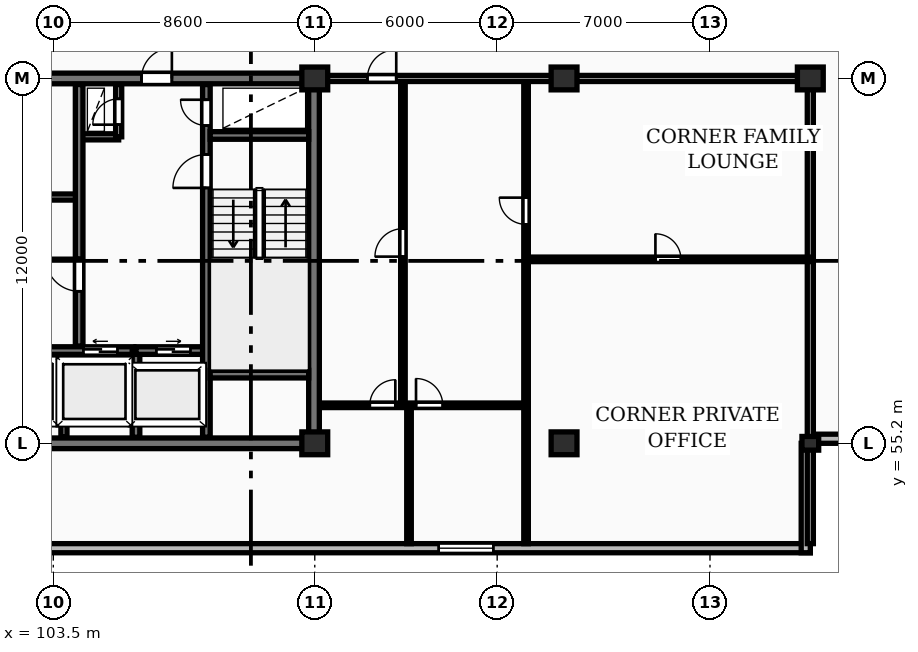
"""IFC4 building model, lengths in metres.
Left out: names, types, materials, properties, quantities, classifications, styles, units other than length and angle.
Written with IfcOpenShell. Run it as: python <this file> out.ifc"""

import sys

from ifc_helpers import new_model, si_unit, direction, frame, frame_2d, origin, origin_2d, place, context, subcontext, project, spatial, rectangle, extrude, element, fill, save


model = new_model("IFC4")
c1 = context("Model", 3, precision=1e-05, world=origin(), true_north=direction((0.0, 1.0)))
c2 = subcontext(c1, "Body", "Model", "MODEL_VIEW")
j1 = project(units=[si_unit("LENGTHUNIT", "METRE"), si_unit("PLANEANGLEUNIT", "RADIAN")], contexts=[c1])
p1 = place(None, origin())
s1 = spatial("IfcSite", under=j1, at=p1, CompositionType="ELEMENT")
p2 = place(p1, origin())
s2 = spatial("IfcBuilding", under=s1, at=p2, CompositionType="ELEMENT")
p3 = place(p2, frame((0.0, 0.0, 207.6)))
s3 = spatial("IfcBuildingStorey", under=s2, at=p3, CompositionType="ELEMENT", Elevation=207.6)
for number, where, z_axis, x_axis in (
    (1, (112.1, 55.2, 0.0), (0.0, 0.0, 1.0), (1.0, 0.0, 0.0)),
    (2, (112.1, 67.2, 0.0), (0.0, 0.0, 1.0), (1.0, 0.0, 0.0)),
    (3, (120.3, 55.2, 0.0), (0.0, 0.0, 1.0), (1.0, 0.0, 0.0)),
    (4, (120.3, 67.2, 0.0), (0.0, 0.0, 1.0), (1.0, 0.0, 0.0)),
):
    element("IfcColumn", number, at=place(p3, frame(where, z_axis=z_axis, x_axis=x_axis)), inside=s3, PredefinedType="COLUMN", context=c2, shape_type="SweptSolid", body=[
        extrude(rectangle(XDim=0.85, YDim=0.75, at=origin_2d()), origin(), (0.0, 0.0, 1.0), 3.25),
    ])
p4 = place(p3, frame((128.4, 55.2, 0.0), z_axis=(0.0, 0.0, 1.0), x_axis=(1.0, 0.0, 0.0)))
e5 = element("IfcColumn", 5, at=p4, inside=s3, PredefinedType="PILASTER", context=c2, shape_type="SweptSolid", body=[
    extrude(rectangle(XDim=0.55, YDim=0.45, at=origin_2d()), origin(), (0.0, 0.0, 1.0), 3.25),
])
p5 = place(p3, frame((128.4, 67.2, 0.0), z_axis=(0.0, 0.0, 1.0), x_axis=(1.0, 0.0, 0.0)))
e6 = element("IfcColumn", 6, at=p5, inside=s3, PredefinedType="COLUMN", context=c2, shape_type="SweptSolid", body=[
    extrude(rectangle(XDim=0.85, YDim=0.75, at=origin_2d()), origin(), (0.0, 0.0, 1.0), 3.25),
])
p6 = place(p3, frame((59.8, 51.75, 0.0), z_axis=(0.0, 0.0, 1.0), x_axis=(1.0, 0.0, 0.0)))
e7 = element("IfcWall", 7, at=p6, inside=s3, PredefinedType="STANDARD", context=c2, shape_type="SweptSolid", body=[
    extrude(rectangle(XDim=68.6, YDim=0.3, at=frame_2d((34.3, 0.0))), origin(), (0.0, 0.0, 1.0), 2.97),
])
p7 = place(p6, frame((13.025, 0.0, 0.85)))
e8 = element("IfcOpeningElement", 8, at=p7, cuts=e7, PredefinedType="OPENING", context=c2, shape_type="SweptSolid", body=[
    extrude(rectangle(XDim=1.8, YDim=1.8, at=frame_2d((0.9, 0.9))), frame((0.0, 0.16, 0.0), z_axis=(0.0, -1.0, 0.0), x_axis=(1.0, 0.0, 0.0)), (0.0, 0.0, 1.0), 0.32),
])
p8 = place(p6, frame((56.375, 0.0, 0.85)))
e9 = element("IfcOpeningElement", 9, at=p8, cuts=e7, PredefinedType="OPENING", context=c2, shape_type="SweptSolid", body=[
    extrude(rectangle(XDim=1.8, YDim=1.8, at=frame_2d((0.9, 0.9))), frame((0.0, 0.16, 0.0), z_axis=(0.0, -1.0, 0.0), x_axis=(1.0, 0.0, 0.0)), (0.0, 0.0, 1.0), 0.32),
])
p9 = place(p3, frame((128.25, 51.6, 0.0), z_axis=(0.0, 0.0, 1.0), x_axis=(0.0, 1.0, 0.0)))
e10 = element("IfcWall", 10, at=p9, inside=s3, PredefinedType="STANDARD", context=c2, shape_type="SweptSolid", body=[
    extrude(rectangle(XDim=3.6, YDim=0.3, at=frame_2d((1.8, 0.0))), origin(), (0.0, 0.0, 1.0), 2.97),
])
p10 = place(p3, frame((128.4, 55.35, 0.0), z_axis=(0.0, 0.0, 1.0), x_axis=(1.0, 0.0, 0.0)))
e11 = element("IfcWall", 11, at=p10, inside=s3, PredefinedType="STANDARD", context=c2, shape_type="SweptSolid", body=[
    extrude(rectangle(XDim=3.6, YDim=0.3, at=frame_2d((1.8, 0.0))), origin(), (0.0, 0.0, 1.0), 2.97),
])
p11 = place(p3, frame((75.95, 55.2, 0.0), z_axis=(0.0, 0.0, 1.0), x_axis=(1.0, 0.0, 0.0)))
e12 = element("IfcWall", 12, at=p11, inside=s3, PredefinedType="SHEAR", context=c2, shape_type="SweptSolid", body=[
    extrude(rectangle(XDim=36.3, YDim=0.35, at=frame_2d((18.15, 0.0))), origin(), (0.0, 0.0, 1.0), 3.25),
])
p12 = place(p3, frame((112.075, 55.375, 0.0), z_axis=(0.0, 0.0, 1.0), x_axis=(0.0, 1.0, 0.0)))
e13 = element("IfcWall", 13, at=p12, inside=s3, PredefinedType="SHEAR", context=c2, shape_type="SweptSolid", body=[
    extrude(rectangle(XDim=11.65, YDim=0.35, at=frame_2d((5.825, 0.0))), origin(), (0.0, 0.0, 1.0), 3.25),
])
p13 = place(p3, frame((75.95, 67.2, 0.0), z_axis=(0.0, 0.0, 1.0), x_axis=(1.0, 0.0, 0.0)))
e14 = element("IfcWall", 14, at=p13, inside=s3, PredefinedType="SHEAR", context=c2, shape_type="SweptSolid", body=[
    extrude(rectangle(XDim=36.3, YDim=0.35, at=frame_2d((18.15, 0.0))), origin(), (0.0, 0.0, 1.0), 3.25),
])
p14 = place(p13, frame((5.25, 0.0, 0.0)))
e15 = element("IfcOpeningElement", 15, at=p14, cuts=e14, PredefinedType="OPENING", context=c2, shape_type="SweptSolid", body=[
    extrude(rectangle(XDim=1.0, YDim=2.15, at=frame_2d((0.5, 1.075))), frame((0.0, 0.185, 0.0), z_axis=(0.0, -1.0, 0.0), x_axis=(1.0, 0.0, 0.0)), (0.0, 0.0, 1.0), 0.37),
])
p15 = place(p13, frame((21.6, 0.0, 0.0)))
e16 = element("IfcOpeningElement", 16, at=p15, cuts=e14, PredefinedType="OPENING", context=c2, shape_type="SweptSolid", body=[
    extrude(rectangle(XDim=1.5, YDim=2.2, at=frame_2d((0.75, 1.1))), frame((0.0, 0.185, 0.0), z_axis=(0.0, -1.0, 0.0), x_axis=(1.0, 0.0, 0.0)), (0.0, 0.0, 1.0), 0.37),
])
p16 = place(p13, frame((30.45, 0.0, 0.0)))
e17 = element("IfcOpeningElement", 17, at=p16, cuts=e14, PredefinedType="OPENING", context=c2, shape_type="SweptSolid", body=[
    extrude(rectangle(XDim=1.0, YDim=2.15, at=frame_2d((0.5, 1.075))), frame((0.0, 0.185, 0.0), z_axis=(0.0, -1.0, 0.0), x_axis=(1.0, 0.0, 0.0)), (0.0, 0.0, 1.0), 0.37),
])
p17 = place(p3, frame((103.85, 55.4, 0.0), z_axis=(0.0, 0.0, 1.0), x_axis=(0.0, 1.0, 0.0)))
e18 = element("IfcWall", 18, at=p17, inside=s3, PredefinedType="PARTITIONING", context=c2, shape_type="SweptSolid", body=[
    extrude(rectangle(XDim=2.72, YDim=0.2, at=frame_2d((1.36, 0.0))), origin(), (0.0, 0.0, 1.0), 2.97),
])
p18 = place(p3, frame((101.55, 58.25, 0.0), z_axis=(0.0, 0.0, 1.0), x_axis=(1.0, 0.0, 0.0)))
e19 = element("IfcWall", 19, at=p18, inside=s3, PredefinedType="SHEAR", context=c2, shape_type="SweptSolid", body=[
    extrude(rectangle(XDim=4.6, YDim=0.25, at=frame_2d((2.3, 0.0))), origin(), (0.0, 0.0, 1.0), 3.25),
])
p19 = place(p18, frame((0.54, 0.0, 0.0)))
e20 = element("IfcOpeningElement", 20, at=p19, cuts=e19, PredefinedType="OPENING", context=c2, shape_type="SweptSolid", body=[
    extrude(rectangle(XDim=1.12, YDim=2.12, at=frame_2d((0.56, 1.06))), frame((0.0, 0.135, 0.0), z_axis=(0.0, -1.0, 0.0), x_axis=(1.0, 0.0, 0.0)), (0.0, 0.0, 1.0), 0.27),
])
p20 = place(p18, frame((2.94, 0.0, 0.0)))
e21 = element("IfcOpeningElement", 21, at=p20, cuts=e19, PredefinedType="OPENING", context=c2, shape_type="SweptSolid", body=[
    extrude(rectangle(XDim=1.12, YDim=2.12, at=frame_2d((0.56, 1.06))), frame((0.0, 0.135, 0.0), z_axis=(0.0, -1.0, 0.0), x_axis=(1.0, 0.0, 0.0)), (0.0, 0.0, 1.0), 0.27),
])
p21 = place(p3, frame((106.22, 55.4, 0.0), z_axis=(0.0, 0.0, 1.0), x_axis=(0.0, 1.0, 0.0)))
e22 = element("IfcWall", 22, at=p21, inside=s3, PredefinedType="SHEAR", context=c2, shape_type="SweptSolid", body=[
    extrude(rectangle(XDim=2.85, YDim=0.25, at=frame_2d((1.425, 0.0))), origin(), (0.0, 0.0, 1.0), 3.25),
])
p22 = place(p3, frame((106.22, 58.25, 0.0), z_axis=(0.0, 0.0, 1.0), x_axis=(1.0, 0.0, 0.0)))
e23 = element("IfcWall", 23, at=p22, inside=s3, PredefinedType="SHEAR", context=c2, shape_type="SweptSolid", body=[
    extrude(rectangle(XDim=2.46, YDim=0.25, at=frame_2d((1.23, 0.0))), origin(), (0.0, 0.0, 1.0), 3.25),
])
p23 = place(p22, frame((0.67, 0.0, 0.0)))
e24 = element("IfcOpeningElement", 24, at=p23, cuts=e23, PredefinedType="OPENING", context=c2, shape_type="SweptSolid", body=[
    extrude(rectangle(XDim=1.12, YDim=2.12, at=frame_2d((0.56, 1.06))), frame((0.0, 0.135, 0.0), z_axis=(0.0, -1.0, 0.0), x_axis=(1.0, 0.0, 0.0)), (0.0, 0.0, 1.0), 0.27),
])
p24 = place(p3, frame((84.42, 63.3, 0.0), z_axis=(0.0, 0.0, 1.0), x_axis=(1.0, 0.0, 0.0)))
e25 = element("IfcWall", 25, at=p24, inside=s3, PredefinedType="PARTITIONING", context=c2, shape_type="SweptSolid", body=[
    extrude(rectangle(XDim=19.83, YDim=0.2, at=frame_2d((9.915, 0.0))), origin(), (0.0, 0.0, 1.0), 2.97),
])
p25 = place(p24, frame((1.15, 0.0, 0.0)))
e26 = element("IfcOpeningElement", 26, at=p25, cuts=e25, PredefinedType="OPENING", context=c2, shape_type="SweptSolid", body=[
    extrude(rectangle(XDim=0.85, YDim=2.05, at=frame_2d((0.425, 1.025))), frame((0.0, 0.11, 0.0), z_axis=(0.0, -1.0, 0.0), x_axis=(1.0, 0.0, 0.0)), (0.0, 0.0, 1.0), 0.22),
])
p26 = place(p24, frame((3.25, 0.0, 0.0)))
e27 = element("IfcOpeningElement", 27, at=p26, cuts=e25, PredefinedType="OPENING", context=c2, shape_type="SweptSolid", body=[
    extrude(rectangle(XDim=0.85, YDim=2.05, at=frame_2d((0.425, 1.025))), frame((0.0, 0.11, 0.0), z_axis=(0.0, -1.0, 0.0), x_axis=(1.0, 0.0, 0.0)), (0.0, 0.0, 1.0), 0.22),
])
p27 = place(p24, frame((13.08, 0.0, 0.0)))
e28 = element("IfcOpeningElement", 28, at=p27, cuts=e25, PredefinedType="OPENING", context=c2, shape_type="SweptSolid", body=[
    extrude(rectangle(XDim=1.5, YDim=2.2, at=frame_2d((0.75, 1.1))), frame((0.0, 0.11, 0.0), z_axis=(0.0, -1.0, 0.0), x_axis=(1.0, 0.0, 0.0)), (0.0, 0.0, 1.0), 0.22),
])
p28 = place(p24, frame((6.78, 0.0, 0.0)))
e29 = element("IfcOpeningElement", 29, at=p28, cuts=e25, PredefinedType="OPENING", context=c2, shape_type="SweptSolid", body=[
    extrude(rectangle(XDim=0.92, YDim=2.08, at=frame_2d((0.46, 1.04))), frame((0.0, 0.11, 0.0), z_axis=(0.0, -1.0, 0.0), x_axis=(1.0, 0.0, 0.0)), (0.0, 0.0, 1.0), 0.22),
])
p29 = place(p24, frame((16.28, 0.0, 0.0)))
e30 = element("IfcOpeningElement", 30, at=p29, cuts=e25, PredefinedType="OPENING", context=c2, shape_type="SweptSolid", body=[
    extrude(rectangle(XDim=0.92, YDim=2.08, at=frame_2d((0.46, 1.04))), frame((0.0, 0.11, 0.0), z_axis=(0.0, -1.0, 0.0), x_axis=(1.0, 0.0, 0.0)), (0.0, 0.0, 1.0), 0.22),
])
p30 = place(p3, frame((104.45, 65.28, 0.0), z_axis=(0.0, 0.0, 1.0), x_axis=(1.0, 0.0, 0.0)))
e31 = element("IfcWall", 31, at=p30, inside=s3, PredefinedType="PARTITIONING", context=c2, shape_type="SweptSolid", body=[
    extrude(rectangle(XDim=1.2, YDim=0.2, at=frame_2d((0.6, 0.0))), origin(), (0.0, 0.0, 1.0), 2.97),
])
p31 = place(p3, frame((105.65, 65.28, 0.0), z_axis=(0.0, 0.0, 1.0), x_axis=(0.0, 1.0, 0.0)))
e32 = element("IfcWall", 32, at=p31, inside=s3, PredefinedType="PARTITIONING", context=c2, shape_type="SweptSolid", body=[
    extrude(rectangle(XDim=1.72, YDim=0.2, at=frame_2d((0.86, 0.0))), origin(), (0.0, 0.0, 1.0), 2.97),
])
p32 = place(p31, frame((0.4, 0.0, 0.0)))
e33 = element("IfcOpeningElement", 33, at=p32, cuts=e32, PredefinedType="OPENING", context=c2, shape_type="SweptSolid", body=[
    extrude(rectangle(XDim=0.85, YDim=2.05, at=frame_2d((0.425, 1.025))), frame((0.0, 0.11, 0.0), z_axis=(0.0, -1.0, 0.0), x_axis=(1.0, 0.0, 0.0)), (0.0, 0.0, 1.0), 0.22),
])
p33 = place(p3, frame((104.35, 58.4, 0.0), z_axis=(0.0, 0.0, 1.0), x_axis=(0.0, 1.0, 0.0)))
e34 = element("IfcWall", 34, at=p33, inside=s3, PredefinedType="SHEAR", context=c2, shape_type="SweptSolid", body=[
    extrude(rectangle(XDim=8.6, YDim=0.25, at=frame_2d((4.3, 0.0))), origin(), (0.0, 0.0, 1.0), 3.25),
])
p34 = place(p33, frame((1.8, 0.0, 0.0)))
e35 = element("IfcOpeningElement", 35, at=p34, cuts=e34, PredefinedType="OPENING", context=c2, shape_type="SweptSolid", body=[
    extrude(rectangle(XDim=1.1, YDim=2.1, at=frame_2d((0.55, 1.05))), frame((0.0, 0.135, 0.0), z_axis=(0.0, -1.0, 0.0), x_axis=(1.0, 0.0, 0.0)), (0.0, 0.0, 1.0), 0.27),
])
p35 = place(p3, frame((108.535, 55.4, 0.0), z_axis=(0.0, 0.0, 1.0), x_axis=(0.0, 1.0, 0.0)))
e36 = element("IfcWall", 36, at=p35, inside=s3, PredefinedType="SHEAR", context=c2, shape_type="SweptSolid", body=[
    extrude(rectangle(XDim=11.6, YDim=0.25, at=frame_2d((5.8, 0.0))), origin(), (0.0, 0.0, 1.0), 3.25),
])
p36 = place(p35, frame((8.2, 0.0, 0.0)))
e37 = element("IfcOpeningElement", 37, at=p36, cuts=e36, PredefinedType="OPENING", context=c2, shape_type="SweptSolid", body=[
    extrude(rectangle(XDim=1.1, YDim=2.1, at=frame_2d((0.55, 1.05))), frame((0.0, 0.135, 0.0), z_axis=(0.0, -1.0, 0.0), x_axis=(1.0, 0.0, 0.0)), (0.0, 0.0, 1.0), 0.27),
])
p37 = place(p35, frame((10.25, 0.0, 0.0)))
e38 = element("IfcOpeningElement", 38, at=p37, cuts=e36, PredefinedType="OPENING", context=c2, shape_type="SweptSolid", body=[
    extrude(rectangle(XDim=0.85, YDim=2.05, at=frame_2d((0.425, 1.025))), frame((0.0, 0.135, 0.0), z_axis=(0.0, -1.0, 0.0), x_axis=(1.0, 0.0, 0.0)), (0.0, 0.0, 1.0), 0.27),
])
for number, where, z_axis, x_axis in (
    (39, (108.66, 57.475, 0.0), (0.0, 0.0, 1.0), (1.0, 0.0, 0.0)),
    (40, (108.66, 65.325, 0.0), (0.0, 0.0, 1.0), (1.0, 0.0, 0.0)),
):
    element("IfcWall", number, at=place(p3, frame(where, z_axis=z_axis, x_axis=x_axis)), inside=s3, PredefinedType="SHEAR", context=c2, shape_type="SweptSolid", body=[
        extrude(rectangle(XDim=3.24, YDim=0.25, at=frame_2d((1.62, 0.0))), origin(), (0.0, 0.0, 1.0), 3.25),
    ])
p38 = place(p3, frame((128.4, 51.9, 0.0), z_axis=(0.0, 0.0, 1.0), x_axis=(0.0, 1.0, 0.0)))
e41 = element("IfcWall", 41, at=p38, inside=s3, PredefinedType="PARTITIONING", context=c2, shape_type="SweptSolid", body=[
    extrude(rectangle(XDim=15.3, YDim=0.2, at=frame_2d((7.65, 0.0))), origin(), (0.0, 0.0, 1.0), 2.277),
])
p39 = place(p3, frame((119.05, 61.25, 0.0), z_axis=(0.0, 0.0, 1.0), x_axis=(1.0, 0.0, 0.0)))
e42 = element("IfcWall", 42, at=p39, inside=s3, PredefinedType="PARTITIONING", context=c2, shape_type="SweptSolid", body=[
    extrude(rectangle(XDim=9.35, YDim=0.15, at=frame_2d((4.675, 0.0))), origin(), (0.0, 0.0, 1.0), 2.97),
])
p40 = place(p39, frame((4.255, 0.0, 0.0)))
e43 = element("IfcOpeningElement", 43, at=p40, cuts=e42, PredefinedType="OPENING", context=c2, shape_type="SweptSolid", body=[
    extrude(rectangle(XDim=0.84, YDim=2.04, at=frame_2d((0.42, 1.02))), frame((0.0, 0.085, 0.0), z_axis=(0.0, -1.0, 0.0), x_axis=(1.0, 0.0, 0.0)), (0.0, 0.0, 1.0), 0.17),
])
p41 = place(p3, frame((119.05, 51.9, 0.0), z_axis=(0.0, 0.0, 1.0), x_axis=(0.0, 1.0, 0.0)))
e44 = element("IfcWall", 44, at=p41, inside=s3, PredefinedType="PARTITIONING", context=c2, shape_type="SweptSolid", body=[
    extrude(rectangle(XDim=15.25, YDim=0.15, at=frame_2d((7.625, 0.0))), origin(), (0.0, 0.0, 1.0), 2.97),
])
p42 = place(p41, frame((10.5, 0.0, 0.0)))
e45 = element("IfcOpeningElement", 45, at=p42, cuts=e44, PredefinedType="OPENING", context=c2, shape_type="SweptSolid", body=[
    extrude(rectangle(XDim=0.88, YDim=2.06, at=frame_2d((0.44, 1.03))), frame((0.0, 0.085, 0.0), z_axis=(0.0, -1.0, 0.0), x_axis=(1.0, 0.0, 0.0)), (0.0, 0.0, 1.0), 0.17),
])
p43 = place(p3, frame((115.0, 56.45, 0.0), z_axis=(0.0, 0.0, 1.0), x_axis=(0.0, 1.0, 0.0)))
e46 = element("IfcWall", 46, at=p43, inside=s3, PredefinedType="PARTITIONING", context=c2, shape_type="SweptSolid", body=[
    extrude(rectangle(XDim=10.7, YDim=0.15, at=frame_2d((5.35, 0.0))), origin(), (0.0, 0.0, 1.0), 2.97),
])
p44 = place(p43, frame((4.89, 0.0, 0.0)))
e47 = element("IfcOpeningElement", 47, at=p44, cuts=e46, PredefinedType="OPENING", context=c2, shape_type="SweptSolid", body=[
    extrude(rectangle(XDim=0.92, YDim=2.08, at=frame_2d((0.46, 1.04))), frame((0.0, 0.085, 0.0), z_axis=(0.0, -1.0, 0.0), x_axis=(1.0, 0.0, 0.0)), (0.0, 0.0, 1.0), 0.17),
])
p45 = place(p3, frame((115.2, 51.9, 0.0), z_axis=(0.0, 0.0, 1.0), x_axis=(0.0, 1.0, 0.0)))
e48 = element("IfcWall", 48, at=p45, inside=s3, PredefinedType="PARTITIONING", context=c2, shape_type="SweptSolid", body=[
    extrude(rectangle(XDim=4.55, YDim=0.15, at=frame_2d((2.275, 0.0))), origin(), (0.0, 0.0, 1.0), 2.97),
])
p46 = place(p3, frame((112.27, 56.45, 0.0), z_axis=(0.0, 0.0, 1.0), x_axis=(1.0, 0.0, 0.0)))
e49 = element("IfcWall", 49, at=p46, inside=s3, PredefinedType="PARTITIONING", context=c2, shape_type="SweptSolid", body=[
    extrude(rectangle(XDim=6.76, YDim=0.15, at=frame_2d((3.38, 0.0))), origin(), (0.0, 0.0, 1.0), 2.97),
])
p47 = place(p46, frame((1.64, 0.0, 0.0)))
e50 = element("IfcOpeningElement", 50, at=p47, cuts=e49, PredefinedType="OPENING", context=c2, shape_type="SweptSolid", body=[
    extrude(rectangle(XDim=0.84, YDim=2.04, at=frame_2d((0.42, 1.02))), frame((0.0, 0.085, 0.0), z_axis=(0.0, -1.0, 0.0), x_axis=(1.0, 0.0, 0.0)), (0.0, 0.0, 1.0), 0.17),
])
p48 = place(p46, frame((3.16, 0.0, 0.0)))
e51 = element("IfcOpeningElement", 51, at=p48, cuts=e49, PredefinedType="OPENING", context=c2, shape_type="SweptSolid", body=[
    extrude(rectangle(XDim=0.88, YDim=2.06, at=frame_2d((0.44, 1.03))), frame((0.0, 0.085, 0.0), z_axis=(0.0, -1.0, 0.0), x_axis=(1.0, 0.0, 0.0)), (0.0, 0.0, 1.0), 0.17),
])
p49 = place(p3, frame((112.25, 67.2, 0.0), z_axis=(0.0, 0.0, 1.0), x_axis=(1.0, 0.0, 0.0)))
e52 = element("IfcWall", 52, at=p49, inside=s3, PredefinedType="PARTITIONING", context=c2, shape_type="SweptSolid", body=[
    extrude(rectangle(XDim=16.15, YDim=0.2, at=frame_2d((8.075, 0.0))), origin(), (0.0, 0.0, 1.0), 2.433),
])
p50 = place(p49, frame((1.58, 0.0, 0.0)))
e53 = element("IfcOpeningElement", 53, at=p50, cuts=e52, PredefinedType="OPENING", context=c2, shape_type="SweptSolid", body=[
    extrude(rectangle(XDim=0.95, YDim=2.15, at=frame_2d((0.475, 1.075))), frame((0.0, 0.11, 0.0), z_axis=(0.0, -1.0, 0.0), x_axis=(1.0, 0.0, 0.0)), (0.0, 0.0, 1.0), 0.22),
])
p51 = place(p8, origin())
e54 = element("IfcWindow", 54, at=p51, inside=s3, PartitioningType="SINGLE_PANEL", PredefinedType="WINDOW", context=c2, shape_type="SweptSolid", body=[
    extrude(rectangle(XDim=1.8, YDim=1.8, at=frame_2d((0.9, 0.9))), frame((0.0, 0.03, 0.0), z_axis=(0.0, -1.0, 0.0), x_axis=(1.0, 0.0, 0.0)), (0.0, 0.0, 1.0), 0.06),
])
fill(e9, e54)
p52 = place(p16, origin())
e55 = element("IfcDoor", 55, at=p52, inside=s3, OperationType="SINGLE_SWING_RIGHT", PredefinedType="DOOR", context=c2, shape_type="SweptSolid", body=[
    extrude(rectangle(XDim=1.0, YDim=2.15, at=frame_2d((0.5, 1.075))), frame((0.0, 0.025, 0.0), z_axis=(0.0, -1.0, 0.0), x_axis=(1.0, 0.0, 0.0)), (0.0, 0.0, 1.0), 0.05),
])
fill(e17, e55)
p53 = place(p20, origin())
e56 = element("IfcDoor", 56, at=p53, inside=s3, OperationType="SLIDING_TO_LEFT", PredefinedType="DOOR", context=c2, shape_type="SweptSolid", body=[
    extrude(rectangle(XDim=1.12, YDim=2.12, at=frame_2d((0.56, 1.06))), frame((0.0, 0.025, 0.0), z_axis=(0.0, -1.0, 0.0), x_axis=(1.0, 0.0, 0.0)), (0.0, 0.0, 1.0), 0.05),
])
fill(e21, e56)
p54 = place(p23, origin())
e57 = element("IfcDoor", 57, at=p54, inside=s3, OperationType="SLIDING_TO_RIGHT", PredefinedType="DOOR", context=c2, shape_type="SweptSolid", body=[
    extrude(rectangle(XDim=1.12, YDim=2.12, at=frame_2d((0.56, 1.06))), frame((0.0, 0.025, 0.0), z_axis=(0.0, -1.0, 0.0), x_axis=(1.0, 0.0, 0.0)), (0.0, 0.0, 1.0), 0.05),
])
fill(e24, e57)
p55 = place(p32, origin())
e58 = element("IfcDoor", 58, at=p55, inside=s3, OperationType="SINGLE_SWING_LEFT", PredefinedType="DOOR", context=c2, shape_type="SweptSolid", body=[
    extrude(rectangle(XDim=0.85, YDim=2.05, at=frame_2d((0.425, 1.025))), frame((0.0, 0.025, 0.0), z_axis=(0.0, -1.0, 0.0), x_axis=(1.0, 0.0, 0.0)), (0.0, 0.0, 1.0), 0.05),
])
fill(e33, e58)
p56 = place(p34, origin())
e59 = element("IfcDoor", 59, at=p56, inside=s3, OperationType="SINGLE_SWING_RIGHT", PredefinedType="DOOR", context=c2, shape_type="SweptSolid", body=[
    extrude(rectangle(XDim=1.1, YDim=2.1, at=frame_2d((0.55, 1.05))), frame((0.0, 0.025, 0.0), z_axis=(0.0, -1.0, 0.0), x_axis=(1.0, 0.0, 0.0)), (0.0, 0.0, 1.0), 0.05),
])
fill(e35, e59)
p57 = place(p36, origin())
e60 = element("IfcDoor", 60, at=p57, inside=s3, OperationType="SINGLE_SWING_LEFT", PredefinedType="DOOR", context=c2, shape_type="SweptSolid", body=[
    extrude(rectangle(XDim=1.1, YDim=2.1, at=frame_2d((0.55, 1.05))), frame((0.0, 0.025, 0.0), z_axis=(0.0, -1.0, 0.0), x_axis=(1.0, 0.0, 0.0)), (0.0, 0.0, 1.0), 0.05),
])
fill(e37, e60)
p58 = place(p37, origin())
e61 = element("IfcDoor", 61, at=p58, inside=s3, OperationType="SINGLE_SWING_RIGHT", PredefinedType="DOOR", context=c2, shape_type="SweptSolid", body=[
    extrude(rectangle(XDim=0.85, YDim=2.05, at=frame_2d((0.425, 1.025))), frame((0.0, 0.025, 0.0), z_axis=(0.0, -1.0, 0.0), x_axis=(1.0, 0.0, 0.0)), (0.0, 0.0, 1.0), 0.05),
])
fill(e38, e61)
p59 = place(p40, origin())
e62 = element("IfcDoor", 62, at=p59, inside=s3, OperationType="SINGLE_SWING_LEFT", PredefinedType="DOOR", context=c2, shape_type="SweptSolid", body=[
    extrude(rectangle(XDim=0.84, YDim=2.04, at=frame_2d((0.42, 1.02))), frame((0.0, 0.025, 0.0), z_axis=(0.0, -1.0, 0.0), x_axis=(1.0, 0.0, 0.0)), (0.0, 0.0, 1.0), 0.05),
])
fill(e43, e62)
p60 = place(p42, origin())
e63 = element("IfcDoor", 63, at=p60, inside=s3, OperationType="SINGLE_SWING_RIGHT", PredefinedType="DOOR", context=c2, shape_type="SweptSolid", body=[
    extrude(rectangle(XDim=0.88, YDim=2.06, at=frame_2d((0.44, 1.03))), frame((0.0, 0.025, 0.0), z_axis=(0.0, -1.0, 0.0), x_axis=(1.0, 0.0, 0.0)), (0.0, 0.0, 1.0), 0.05),
])
fill(e45, e63)
p61 = place(p44, origin())
e64 = element("IfcDoor", 64, at=p61, inside=s3, OperationType="SINGLE_SWING_LEFT", PredefinedType="DOOR", context=c2, shape_type="SweptSolid", body=[
    extrude(rectangle(XDim=0.92, YDim=2.08, at=frame_2d((0.46, 1.04))), frame((0.0, 0.025, 0.0), z_axis=(0.0, -1.0, 0.0), x_axis=(1.0, 0.0, 0.0)), (0.0, 0.0, 1.0), 0.05),
])
fill(e47, e64)
p62 = place(p47, origin())
e65 = element("IfcDoor", 65, at=p62, inside=s3, OperationType="SINGLE_SWING_RIGHT", PredefinedType="DOOR", context=c2, shape_type="SweptSolid", body=[
    extrude(rectangle(XDim=0.84, YDim=2.04, at=frame_2d((0.42, 1.02))), frame((0.0, 0.025, 0.0), z_axis=(0.0, -1.0, 0.0), x_axis=(1.0, 0.0, 0.0)), (0.0, 0.0, 1.0), 0.05),
])
fill(e50, e65)
p63 = place(p48, origin())
e66 = element("IfcDoor", 66, at=p63, inside=s3, OperationType="SINGLE_SWING_LEFT", PredefinedType="DOOR", context=c2, shape_type="SweptSolid", body=[
    extrude(rectangle(XDim=0.88, YDim=2.06, at=frame_2d((0.44, 1.03))), frame((0.0, 0.025, 0.0), z_axis=(0.0, -1.0, 0.0), x_axis=(1.0, 0.0, 0.0)), (0.0, 0.0, 1.0), 0.05),
])
fill(e51, e66)
p64 = place(p50, origin())
e67 = element("IfcDoor", 67, at=p64, inside=s3, OperationType="SINGLE_SWING_RIGHT", PredefinedType="DOOR", context=c2, shape_type="SweptSolid", body=[
    extrude(rectangle(XDim=0.95, YDim=2.15, at=frame_2d((0.475, 1.075))), frame((0.0, 0.025, 0.0), z_axis=(0.0, -1.0, 0.0), x_axis=(1.0, 0.0, 0.0)), (0.0, 0.0, 1.0), 0.05),
])
fill(e53, e67)
save(model, sys.argv[1])
